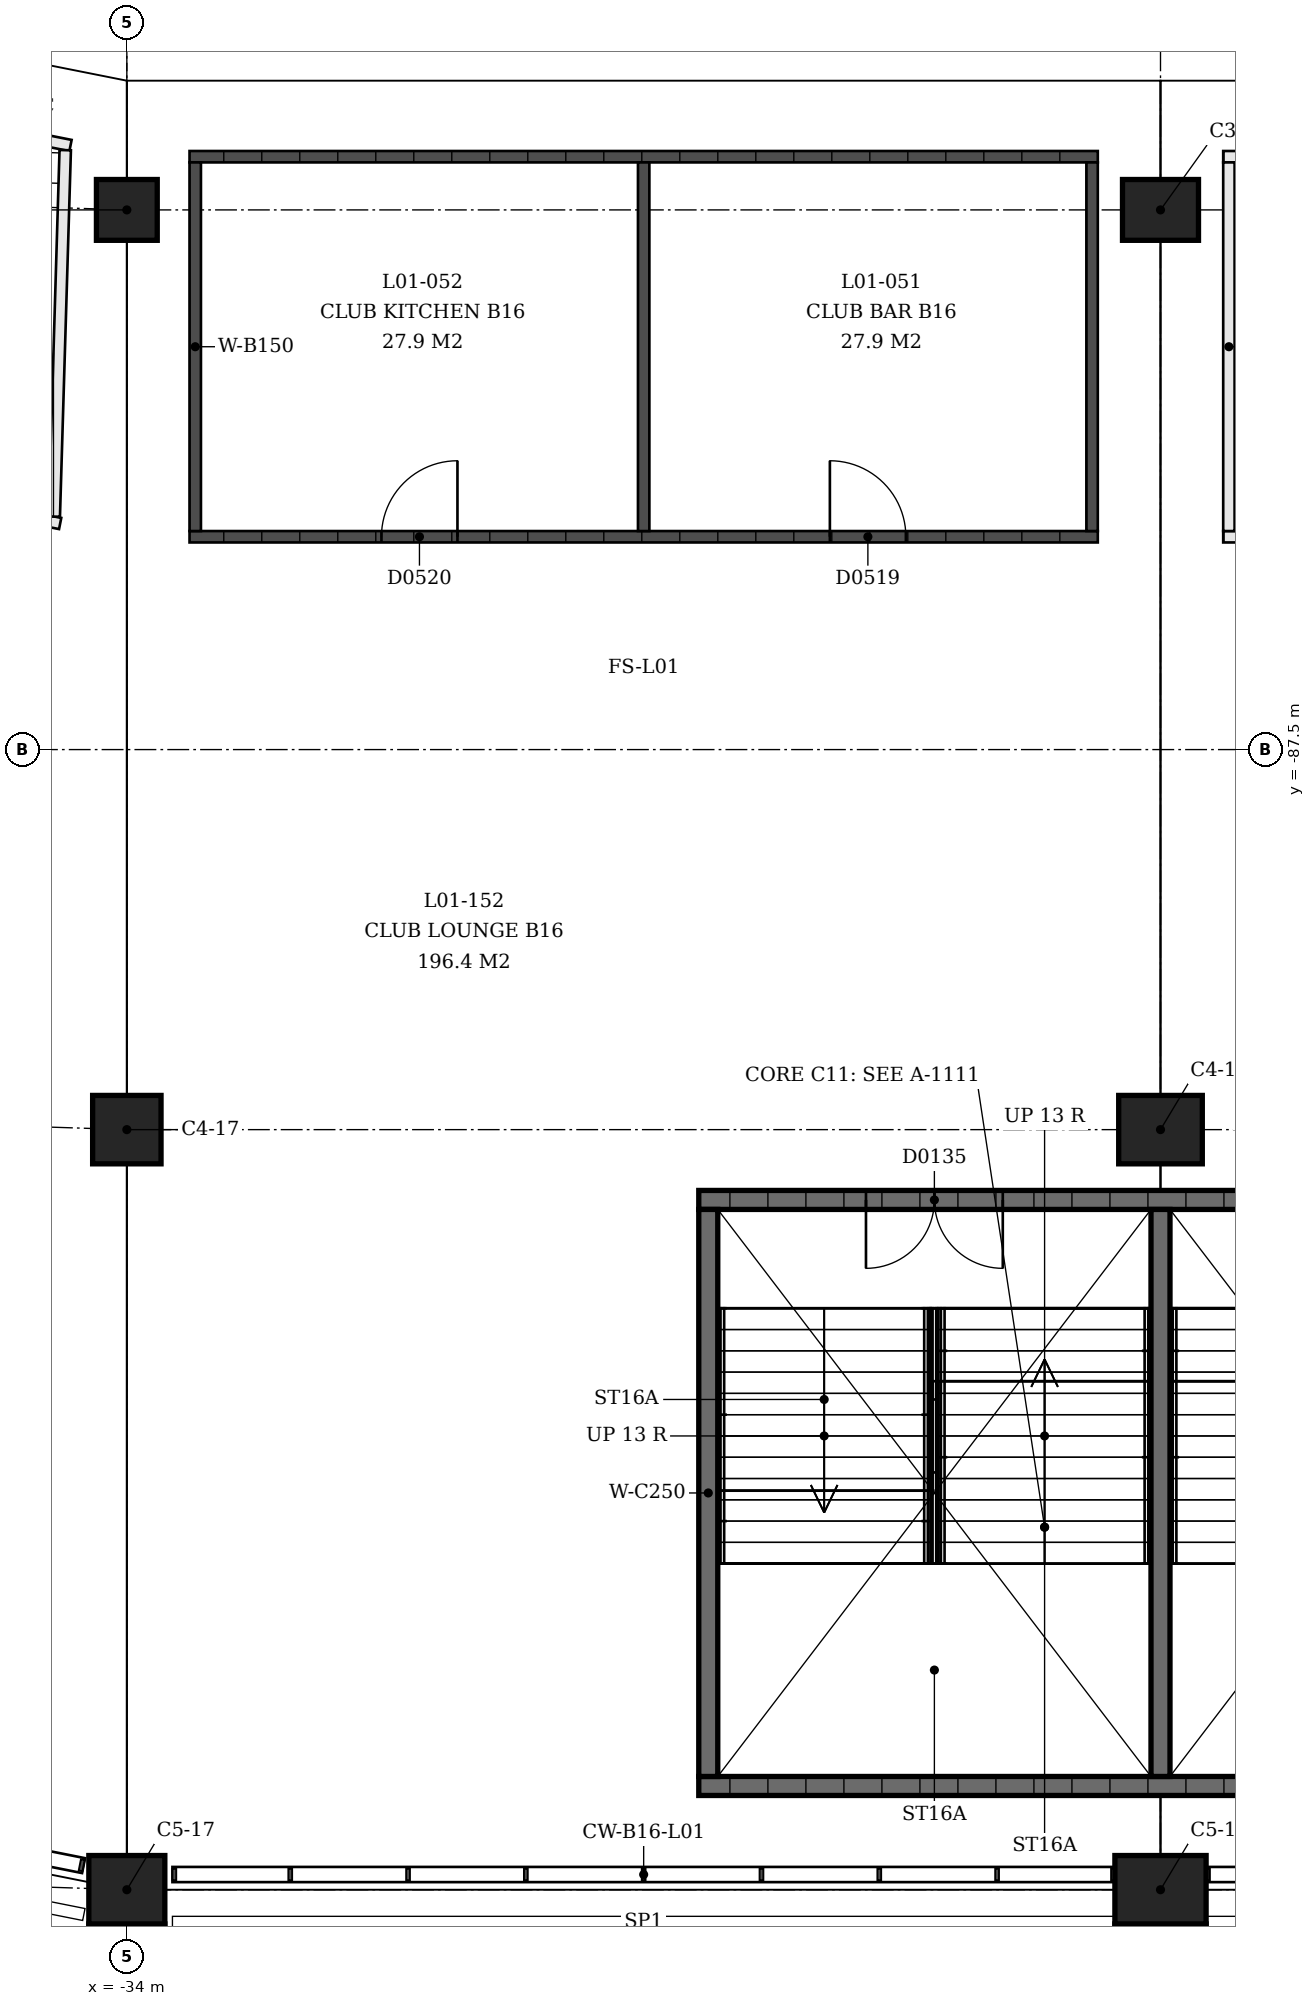
"""IFC4 building model, lengths in metres.
Left out: names, types, materials, properties, quantities, classifications, styles, units other than length and angle.
Written with IfcOpenShell. Run it as: python <this file> out.ifc"""

import sys

from ifc_helpers import new_model, si_unit, direction, frame, frame_2d, origin, origin_2d, place, context, subcontext, project, spatial, rectangle, extrude, element, fill, save


model = new_model("IFC4")
c1 = context("Model", 3, precision=1e-05, world=origin(), true_north=direction((0.0, 1.0)))
c2 = subcontext(c1, "Body", "Model", "MODEL_VIEW")
j1 = project(units=[si_unit("LENGTHUNIT", "METRE"), si_unit("PLANEANGLEUNIT", "RADIAN")], contexts=[c1])
p1 = place(None, origin())
s1 = spatial("IfcSite", under=j1, at=p1, CompositionType="ELEMENT")
p2 = place(p1, origin())
s2 = spatial("IfcBuilding", under=s1, at=p2, CompositionType="ELEMENT")
p3 = place(p2, frame((0.0, 0.0, 4.5)))
s3 = spatial("IfcBuildingStorey", under=s2, at=p3, CompositionType="ELEMENT", Elevation=4.5)
p4 = place(p3, frame((-20.4, -80.4, 0.0), z_axis=(0.0, 0.0, 1.0), x_axis=(1.0, 0.0, 0.0)))
e1 = element("IfcColumn", 1, at=p4, inside=s3, PredefinedType="COLUMN", context=c2, shape_type="SweptSolid", body=[
    extrude(rectangle(XDim=1.0, YDim=0.8, at=origin_2d()), origin(), (0.0, 0.0, 1.0), 4.5),
])
p5 = place(p3, frame((-20.4, -92.5, 0.0), z_axis=(0.0, 0.0, 1.0), x_axis=(1.0, 0.0, 0.0)))
e2 = element("IfcColumn", 2, at=p5, inside=s3, PredefinedType="COLUMN", context=c2, shape_type="SweptSolid", body=[
    extrude(rectangle(XDim=1.1, YDim=0.9, at=origin_2d()), origin(), (0.0, 0.0, 1.0), 4.5),
])
p6 = place(p3, frame((-20.4, -102.5, 0.0), z_axis=(0.0, 0.0, 1.0), x_axis=(1.0, 0.0, 0.0)))
e3 = element("IfcColumn", 3, at=p6, inside=s3, PredefinedType="COLUMN", context=c2, shape_type="SweptSolid", body=[
    extrude(rectangle(XDim=1.2, YDim=0.9, at=origin_2d()), origin(), (0.0, 0.0, 1.0), 4.5),
])
p7 = place(p3, frame((-34.0, -80.4, 0.0), z_axis=(0.0, 0.0, 1.0), x_axis=(1.0, 0.0, 0.0)))
e4 = element("IfcColumn", 4, at=p7, inside=s3, PredefinedType="COLUMN", context=c2, shape_type="SweptSolid", body=[
    extrude(rectangle(XDim=0.8, YDim=0.8, at=origin_2d()), origin(), (0.0, 0.0, 1.0), 4.5),
])
p8 = place(p3, frame((-34.0, -92.5, 0.0), z_axis=(0.0, 0.0, 1.0), x_axis=(1.0, 0.0, 0.0)))
e5 = element("IfcColumn", 5, at=p8, inside=s3, PredefinedType="COLUMN", context=c2, shape_type="SweptSolid", body=[
    extrude(rectangle(XDim=0.9, YDim=0.9, at=origin_2d()), origin(), (0.0, 0.0, 1.0), 4.5),
])
p9 = place(p3, frame((-34.0, -102.5, 0.0), z_axis=(0.0, 0.0, 1.0), x_axis=(1.0, 0.0, 0.0)))
e6 = element("IfcColumn", 6, at=p9, inside=s3, PredefinedType="COLUMN", context=c2, shape_type="SweptSolid", body=[
    extrude(rectangle(XDim=1.0, YDim=0.9, at=origin_2d()), origin(), (0.0, 0.0, 1.0), 4.5),
])
p10 = place(p3, frame((-26.475, -93.425, 0.0), z_axis=(0.0, 0.0, 1.0), x_axis=(1.0, 0.0, 0.0)))
e7 = element("IfcWall", 7, at=p10, inside=s3, PredefinedType="SHEAR", context=c2, shape_type="SweptSolid", body=[
    extrude(rectangle(XDim=12.15, YDim=0.25, at=frame_2d((6.075, 0.0))), origin(), (0.0, 0.0, 1.0), 4.09),
])
p11 = place(p10, frame((2.2, 0.0, 0.0)))
e8 = element("IfcOpeningElement", 8, at=p11, cuts=e7, PredefinedType="OPENING", context=c2, shape_type="SweptSolid", body=[
    extrude(rectangle(XDim=1.8, YDim=2.1, at=frame_2d((0.9, 1.05))), frame((0.0, 0.125, 0.0), z_axis=(0.0, -1.0, 0.0), x_axis=(1.0, 0.0, 0.0)), (0.0, 0.0, 1.0), 0.25),
])
p12 = place(p10, frame((8.15, 0.0, 0.0)))
e9 = element("IfcOpeningElement", 9, at=p12, cuts=e7, PredefinedType="OPENING", context=c2, shape_type="SweptSolid", body=[
    extrude(rectangle(XDim=1.8, YDim=2.1, at=frame_2d((0.9, 1.05))), frame((0.0, 0.125, 0.0), z_axis=(0.0, -1.0, 0.0), x_axis=(1.0, 0.0, 0.0)), (0.0, 0.0, 1.0), 0.25),
])
p13 = place(p3, frame((-26.475, -101.135, 0.0), z_axis=(0.0, 0.0, 1.0), x_axis=(1.0, 0.0, 0.0)))
e10 = element("IfcWall", 10, at=p13, inside=s3, PredefinedType="SHEAR", context=c2, shape_type="SweptSolid", body=[
    extrude(rectangle(XDim=12.15, YDim=0.25, at=frame_2d((6.075, 0.0))), origin(), (0.0, 0.0, 1.0), 4.09),
])
for number, where, z_axis, x_axis in (
    (11, (-26.35, -93.55, 0.0), (0.0, 0.0, 1.0), (0.0, -1.0, 0.0)),
    (12, (-20.4, -93.55, 0.0), (0.0, 0.0, 1.0), (0.0, -1.0, 0.0)),
):
    element("IfcWall", number, at=place(p3, frame(where, z_axis=z_axis, x_axis=x_axis)), inside=s3, PredefinedType="SHEAR", context=c2, shape_type="SweptSolid", body=[
        extrude(rectangle(XDim=7.46, YDim=0.25, at=frame_2d((3.73, 0.0))), origin(), (0.0, 0.0, 1.0), 4.09),
    ])
p14 = place(p3, frame((-19.575, -79.7, 0.0), z_axis=(0.0, 0.0, 1.0), x_axis=(1.0, 0.0, 0.0)))
e13 = element("IfcWall", 13, at=p14, inside=s3, PredefinedType="PARTITIONING", context=c2, shape_type="SweptSolid", body=[
    extrude(rectangle(XDim=11.95, YDim=0.15, at=frame_2d((5.975, 0.0))), origin(), (0.0, 0.0, 1.0), 3.0),
])
p15 = place(p3, frame((-19.575, -84.7, 0.0), z_axis=(0.0, 0.0, 1.0), x_axis=(1.0, 0.0, 0.0)))
e14 = element("IfcWall", 14, at=p15, inside=s3, PredefinedType="PARTITIONING", context=c2, shape_type="SweptSolid", body=[
    extrude(rectangle(XDim=11.95, YDim=0.15, at=frame_2d((5.975, 0.0))), origin(), (0.0, 0.0, 1.0), 3.0),
])
p16 = place(p15, frame((1.454, 0.0, 0.0)))
e15 = element("IfcOpeningElement", 15, at=p16, cuts=e14, PredefinedType="OPENING", context=c2, shape_type="SweptSolid", body=[
    extrude(rectangle(XDim=0.9, YDim=2.1, at=frame_2d((0.45, 1.05))), frame((0.0, 0.075, 0.0), z_axis=(0.0, -1.0, 0.0), x_axis=(1.0, 0.0, 0.0)), (0.0, 0.0, 1.0), 0.15),
])
p17 = place(p15, frame((5.112, 0.0, 0.0)))
e16 = element("IfcOpeningElement", 16, at=p17, cuts=e14, PredefinedType="OPENING", context=c2, shape_type="SweptSolid", body=[
    extrude(rectangle(XDim=0.9, YDim=2.1, at=frame_2d((0.45, 1.05))), frame((0.0, 0.075, 0.0), z_axis=(0.0, -1.0, 0.0), x_axis=(1.0, 0.0, 0.0)), (0.0, 0.0, 1.0), 0.15),
])
p18 = place(p15, frame((7.962, 0.0, 0.0)))
e17 = element("IfcOpeningElement", 17, at=p18, cuts=e14, PredefinedType="OPENING", context=c2, shape_type="SweptSolid", body=[
    extrude(rectangle(XDim=1.1, YDim=2.1, at=frame_2d((0.55, 1.05))), frame((0.0, 0.075, 0.0), z_axis=(0.0, -1.0, 0.0), x_axis=(1.0, 0.0, 0.0)), (0.0, 0.0, 1.0), 0.15),
])
p19 = place(p15, frame((10.204, 0.0, 0.0)))
e18 = element("IfcOpeningElement", 18, at=p19, cuts=e14, PredefinedType="OPENING", context=c2, shape_type="SweptSolid", body=[
    extrude(rectangle(XDim=1.1, YDim=2.1, at=frame_2d((0.55, 1.05))), frame((0.0, 0.075, 0.0), z_axis=(0.0, -1.0, 0.0), x_axis=(1.0, 0.0, 0.0)), (0.0, 0.0, 1.0), 0.15),
])
p20 = place(p3, frame((-19.5, -79.775, 0.0), z_axis=(0.0, 0.0, 1.0), x_axis=(0.0, -1.0, 0.0)))
e19 = element("IfcWall", 19, at=p20, inside=s3, PredefinedType="PARTITIONING", context=c2, shape_type="SweptSolid", body=[
    extrude(rectangle(XDim=4.85, YDim=0.15, at=frame_2d((2.425, 0.0))), origin(), (0.0, 0.0, 1.0), 3.0),
])
p21 = place(p3, frame((-21.225, -79.7, 0.0), z_axis=(0.0, 0.0, 1.0), x_axis=(-1.0, 0.0, 0.0)))
e20 = element("IfcWall", 20, at=p21, inside=s3, PredefinedType="SOLIDWALL", context=c2, shape_type="SweptSolid", body=[
    extrude(rectangle(XDim=11.95, YDim=0.15, at=frame_2d((5.975, 0.0))), origin(), (0.0, 0.0, 1.0), 3.0),
])
p22 = place(p3, frame((-21.225, -84.7, 0.0), z_axis=(0.0, 0.0, 1.0), x_axis=(-1.0, 0.0, 0.0)))
e21 = element("IfcWall", 21, at=p22, inside=s3, PredefinedType="SOLIDWALL", context=c2, shape_type="SweptSolid", body=[
    extrude(rectangle(XDim=11.95, YDim=0.15, at=frame_2d((5.975, 0.0))), origin(), (0.0, 0.0, 1.0), 3.0),
])
p23 = place(p22, frame((2.525, 0.0, 0.0)))
e22 = element("IfcOpeningElement", 22, at=p23, cuts=e21, PredefinedType="OPENING", context=c2, shape_type="SweptSolid", body=[
    extrude(rectangle(XDim=1.0, YDim=2.1, at=frame_2d((0.5, 1.05))), frame((0.0, 0.075, 0.0), z_axis=(0.0, -1.0, 0.0), x_axis=(1.0, 0.0, 0.0)), (0.0, 0.0, 1.0), 0.15),
])
p24 = place(p22, frame((8.425, 0.0, 0.0)))
e23 = element("IfcOpeningElement", 23, at=p24, cuts=e21, PredefinedType="OPENING", context=c2, shape_type="SweptSolid", body=[
    extrude(rectangle(XDim=1.0, YDim=2.1, at=frame_2d((0.5, 1.05))), frame((0.0, 0.075, 0.0), z_axis=(0.0, -1.0, 0.0), x_axis=(1.0, 0.0, 0.0)), (0.0, 0.0, 1.0), 0.15),
])
for number, where, z_axis, x_axis in (
    (24, (-21.3, -79.775, 0.0), (0.0, 0.0, 1.0), (0.0, -1.0, 0.0)),
    (25, (-27.2, -79.775, 0.0), (0.0, 0.0, 1.0), (0.0, -1.0, 0.0)),
    (26, (-33.1, -79.775, 0.0), (0.0, 0.0, 1.0), (0.0, -1.0, 0.0)),
):
    element("IfcWall", number, at=place(p3, frame(where, z_axis=z_axis, x_axis=x_axis)), inside=s3, PredefinedType="SOLIDWALL", context=c2, shape_type="SweptSolid", body=[
        extrude(rectangle(XDim=4.85, YDim=0.15, at=frame_2d((2.425, 0.0))), origin(), (0.0, 0.0, 1.0), 3.0),
    ])
p25 = place(p3, frame((-43.668, -77.777, 0.0), z_axis=(0.0, 0.0, 1.0), x_axis=(0.980786464492, -0.195084369103, 0.0)))
e27 = element("IfcWall", 27, at=p25, inside=s3, PredefinedType="PARTITIONING", context=c2, shape_type="SweptSolid", body=[
    extrude(rectangle(XDim=9.102, YDim=0.15, at=frame_2d((4.551, 0.0))), origin(), (0.0, 0.0, 1.0), 3.0),
])
p26 = place(p3, frame((-45.445, -82.423, 0.0), z_axis=(0.0, 0.0, 1.0), x_axis=(0.98078580384, -0.195087690502, 0.0)))
e28 = element("IfcWall", 28, at=p26, inside=s3, PredefinedType="PARTITIONING", context=c2, shape_type="SweptSolid", body=[
    extrude(rectangle(XDim=10.775, YDim=0.15, at=frame_2d((5.387, 0.0))), origin(), (0.0, 0.0, 1.0), 3.0),
])
p27 = place(p26, frame((1.276, 0.0, 0.0)))
e29 = element("IfcOpeningElement", 29, at=p27, cuts=e28, PredefinedType="OPENING", context=c2, shape_type="SweptSolid", body=[
    extrude(rectangle(XDim=0.9, YDim=2.1, at=frame_2d((0.45, 1.05))), frame((0.0, 0.075, 0.0), z_axis=(0.0, -1.0, 0.0), x_axis=(1.0, 0.0, 0.0)), (0.0, 0.0, 1.0), 0.15),
])
p28 = place(p26, frame((4.566, 0.0, 0.0)))
e30 = element("IfcOpeningElement", 30, at=p28, cuts=e28, PredefinedType="OPENING", context=c2, shape_type="SweptSolid", body=[
    extrude(rectangle(XDim=0.9, YDim=2.1, at=frame_2d((0.45, 1.05))), frame((0.0, 0.075, 0.0), z_axis=(0.0, -1.0, 0.0), x_axis=(1.0, 0.0, 0.0)), (0.0, 0.0, 1.0), 0.15),
])
p29 = place(p26, frame((7.119, 0.0, 0.0)))
e31 = element("IfcOpeningElement", 31, at=p29, cuts=e28, PredefinedType="OPENING", context=c2, shape_type="SweptSolid", body=[
    extrude(rectangle(XDim=1.1, YDim=2.1, at=frame_2d((0.55, 1.05))), frame((0.0, 0.075, 0.0), z_axis=(0.0, -1.0, 0.0), x_axis=(1.0, 0.0, 0.0)), (0.0, 0.0, 1.0), 0.15),
])
p30 = place(p26, frame((9.135, 0.0, 0.0)))
e32 = element("IfcOpeningElement", 32, at=p30, cuts=e28, PredefinedType="OPENING", context=c2, shape_type="SweptSolid", body=[
    extrude(rectangle(XDim=1.1, YDim=2.1, at=frame_2d((0.55, 1.05))), frame((0.0, 0.075, 0.0), z_axis=(0.0, -1.0, 0.0), x_axis=(1.0, 0.0, 0.0)), (0.0, 0.0, 1.0), 0.15),
])
p31 = place(p3, frame((-34.811, -79.614, 0.0), z_axis=(0.0, 0.0, 1.0), x_axis=(-0.02991368842, -0.999552485488, 0.0)))
e33 = element("IfcWall", 33, at=p31, inside=s3, PredefinedType="PARTITIONING", context=c2, shape_type="SweptSolid", body=[
    extrude(rectangle(XDim=4.823, YDim=0.15, at=frame_2d((2.412, 0.0))), origin(), (0.0, 0.0, 1.0), 3.0),
])
p32 = place(p11, origin())
e34 = element("IfcDoor", 34, at=p32, inside=s3, OperationType="DOUBLE_DOOR_SINGLE_SWING", PredefinedType="DOOR", context=c2, shape_type="SweptSolid", body=[
    extrude(rectangle(XDim=1.8, YDim=2.1, at=frame_2d((0.9, 1.05))), frame((0.0, 0.025, 0.0), z_axis=(0.0, -1.0, 0.0), x_axis=(1.0, 0.0, 0.0)), (0.0, 0.0, 1.0), 0.05),
])
fill(e8, e34)
p33 = place(p23, origin())
e35 = element("IfcDoor", 35, at=p33, inside=s3, OperationType="SINGLE_SWING_RIGHT", PredefinedType="DOOR", context=c2, shape_type="SweptSolid", body=[
    extrude(rectangle(XDim=1.0, YDim=2.1, at=frame_2d((0.5, 1.05))), frame((0.0, 0.025, 0.0), z_axis=(0.0, -1.0, 0.0), x_axis=(1.0, 0.0, 0.0)), (0.0, 0.0, 1.0), 0.05),
])
fill(e22, e35)
p34 = place(p24, origin())
e36 = element("IfcDoor", 36, at=p34, inside=s3, OperationType="SINGLE_SWING_LEFT", PredefinedType="DOOR", context=c2, shape_type="SweptSolid", body=[
    extrude(rectangle(XDim=1.0, YDim=2.1, at=frame_2d((0.5, 1.05))), frame((0.0, 0.025, 0.0), z_axis=(0.0, -1.0, 0.0), x_axis=(1.0, 0.0, 0.0)), (0.0, 0.0, 1.0), 0.05),
])
fill(e23, e36)
save(model, sys.argv[1])
